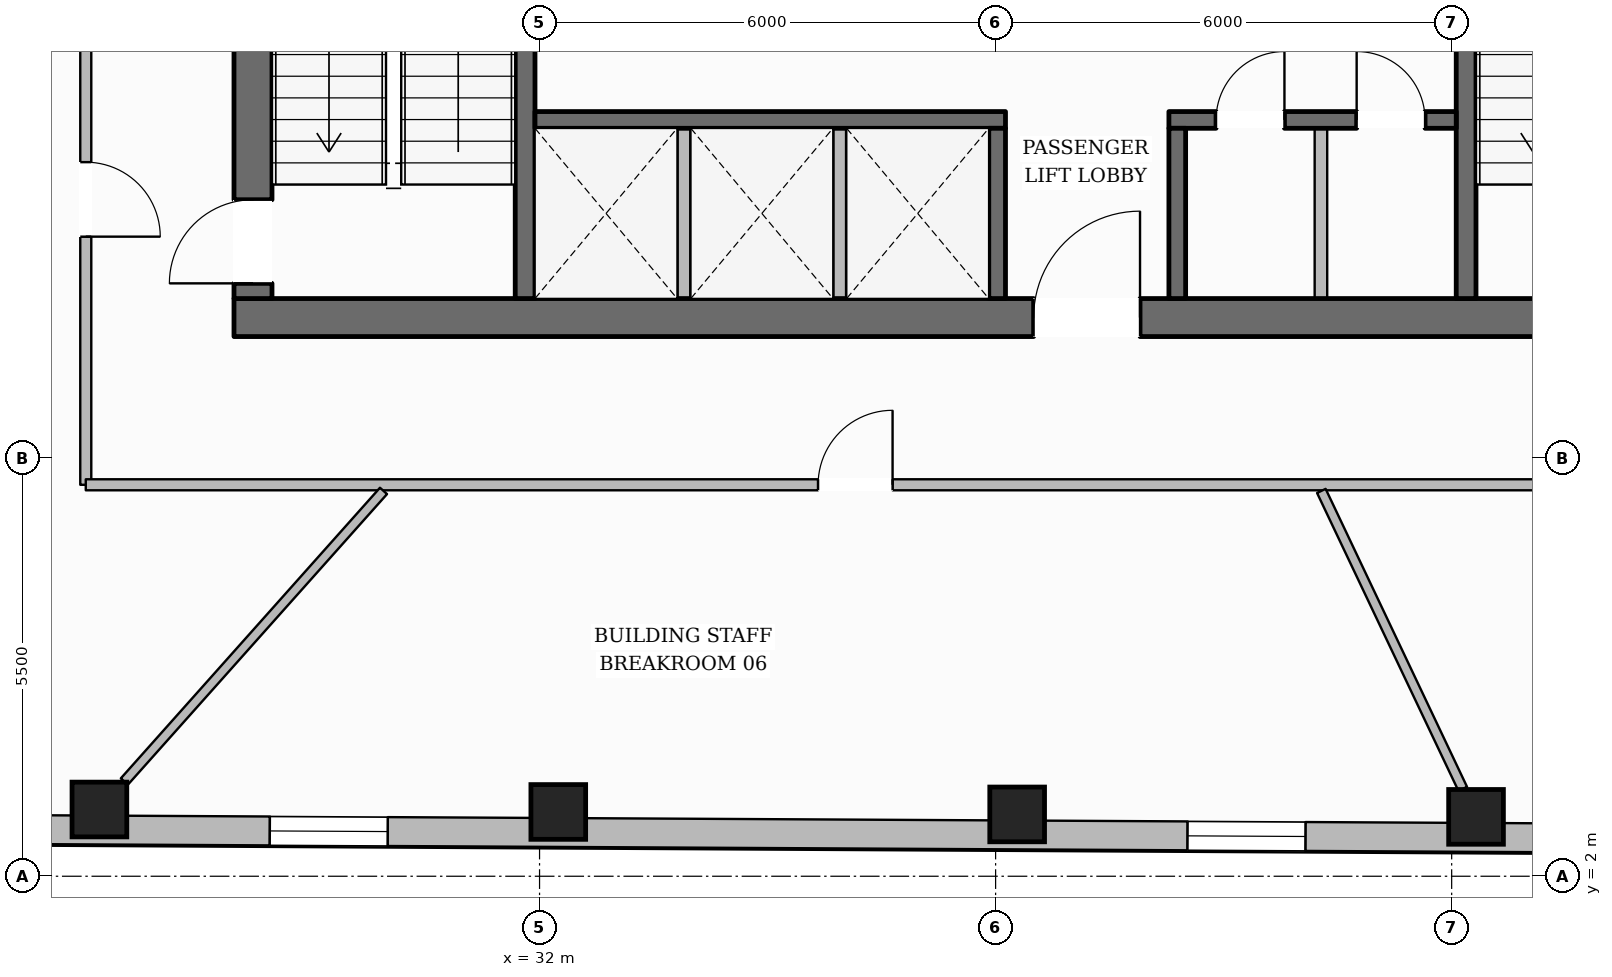
"""IFC4 building model, lengths in metres.
Left out: names, types, materials, properties, quantities, classifications, styles, units other than length and angle.
Written with IfcOpenShell. Run it as: python <this file> out.ifc"""

import sys

from ifc_helpers import new_model, si_unit, direction, frame, frame_2d, origin, origin_2d, place, context, subcontext, project, spatial, rectangle, hollow_rectangle, extrude, element, fill, save


model = new_model("IFC4")
c1 = context("Model", 3, precision=1e-05, world=origin(), true_north=direction((0.0, 1.0)))
c2 = subcontext(c1, "Body", "Model", "MODEL_VIEW")
j1 = project(units=[si_unit("LENGTHUNIT", "METRE"), si_unit("PLANEANGLEUNIT", "RADIAN")], contexts=[c1])
p1 = place(None, origin())
s1 = spatial("IfcSite", under=j1, at=p1, CompositionType="ELEMENT")
p2 = place(p1, origin())
s2 = spatial("IfcBuilding", under=s1, at=p2, CompositionType="ELEMENT")
p3 = place(p2, frame((0.0, 0.0, 124.0)))
s3 = spatial("IfcBuildingStorey", under=s2, at=p3, CompositionType="ELEMENT", Elevation=124.0)
p4 = place(p3, frame((27.98, 9.35, 0.0), z_axis=(0.0, 0.0, 1.0), x_axis=(1.0, 0.0, 0.0)))
e1 = element("IfcWall", 1, at=p4, inside=s3, PredefinedType="SOLIDWALL", context=c2, shape_type="SweptSolid", body=[
    extrude(rectangle(XDim=20.04, YDim=0.5, at=frame_2d((10.02, 0.0))), origin(), (0.0, 0.0, 1.0), 3.6),
])
p5 = place(p4, frame((10.52, 0.0, 0.0)))
e2 = element("IfcOpeningElement", 2, at=p5, cuts=e1, PredefinedType="OPENING", context=c2, shape_type="SweptSolid", body=[
    extrude(rectangle(XDim=1.4, YDim=2.2, at=frame_2d((0.7, 1.1))), frame((0.0, 0.26, 0.0), z_axis=(0.0, -1.0, 0.0), x_axis=(1.0, 0.0, 0.0)), (0.0, 0.0, 1.0), 0.52),
])
p6 = place(p3, frame((28.23, 9.6, 0.0), z_axis=(0.0, 0.0, 1.0), x_axis=(0.0, 1.0, 0.0)))
e3 = element("IfcWall", 3, at=p6, inside=s3, PredefinedType="SOLIDWALL", context=c2, shape_type="SweptSolid", body=[
    extrude(rectangle(XDim=13.0, YDim=0.5, at=frame_2d((6.5, 0.0))), origin(), (0.0, 0.0, 1.0), 3.6),
])
p7 = place(p6, frame((0.2, 0.0, 0.0)))
e4 = element("IfcOpeningElement", 4, at=p7, cuts=e3, PredefinedType="OPENING", context=c2, shape_type="SweptSolid", body=[
    extrude(rectangle(XDim=1.1, YDim=2.15, at=frame_2d((0.55, 1.075))), frame((0.0, 0.26, 0.0), z_axis=(0.0, -1.0, 0.0), x_axis=(1.0, 0.0, 0.0)), (0.0, 0.0, 1.0), 0.52),
])
p8 = place(p6, frame((8.4, 0.0, 0.0)))
e5 = element("IfcOpeningElement", 5, at=p8, cuts=e3, PredefinedType="OPENING", context=c2, shape_type="SweptSolid", body=[
    extrude(rectangle(XDim=0.9, YDim=2.1, at=frame_2d((0.45, 1.05))), frame((0.0, 0.26, 0.0), z_axis=(0.0, -1.0, 0.0), x_axis=(1.0, 0.0, 0.0)), (0.0, 0.0, 1.0), 0.52),
])
p9 = place(p3, frame((31.81, 9.6, 0.0), z_axis=(0.0, 0.0, 1.0), x_axis=(0.0, 1.0, 0.0)))
e6 = element("IfcWall", 6, at=p9, inside=s3, PredefinedType="SHEAR", context=c2, shape_type="SweptSolid", body=[
    extrude(rectangle(XDim=13.0, YDim=0.26, at=frame_2d((6.5, 0.0))), origin(), (0.0, 0.0, 1.0), 3.6),
])
p10 = place(p9, frame((10.925, 0.0, 0.0)))
e7 = element("IfcOpeningElement", 7, at=p10, cuts=e6, PredefinedType="OPENING", context=c2, shape_type="SweptSolid", body=[
    extrude(rectangle(XDim=1.25, YDim=2.25, at=frame_2d((0.625, 1.125))), frame((0.0, 0.14, 0.0), z_axis=(0.0, -1.0, 0.0), x_axis=(1.0, 0.0, 0.0)), (0.0, 0.0, 1.0), 0.28),
])
p11 = place(p3, frame((44.19, 9.6, 0.0), z_axis=(0.0, 0.0, 1.0), x_axis=(0.0, 1.0, 0.0)))
e8 = element("IfcWall", 8, at=p11, inside=s3, PredefinedType="SHEAR", context=c2, shape_type="SweptSolid", body=[
    extrude(rectangle(XDim=13.0, YDim=0.26, at=frame_2d((6.5, 0.0))), origin(), (0.0, 0.0, 1.0), 3.6),
])
p12 = place(p11, frame((10.925, 0.0, 0.0)))
e9 = element("IfcOpeningElement", 9, at=p12, cuts=e8, PredefinedType="OPENING", context=c2, shape_type="SweptSolid", body=[
    extrude(rectangle(XDim=1.25, YDim=2.25, at=frame_2d((0.625, 1.125))), frame((0.0, 0.14, 0.0), z_axis=(0.0, -1.0, 0.0), x_axis=(1.0, 0.0, 0.0)), (0.0, 0.0, 1.0), 0.28),
])
p13 = place(p3, frame((31.94, 11.95, 0.0), z_axis=(0.0, 0.0, 1.0), x_axis=(1.0, 0.0, 0.0)))
e10 = element("IfcWall", 10, at=p13, inside=s3, PredefinedType="SOLIDWALL", context=c2, shape_type="SweptSolid", body=[
    extrude(rectangle(XDim=6.19, YDim=0.22, at=frame_2d((3.095, 0.0))), origin(), (0.0, 0.0, 1.0), 3.6),
])
p14 = place(p3, frame((40.28, 11.95, 0.0), z_axis=(0.0, 0.0, 1.0), x_axis=(1.0, 0.0, 0.0)))
e11 = element("IfcWall", 11, at=p14, inside=s3, PredefinedType="SOLIDWALL", context=c2, shape_type="SweptSolid", body=[
    extrude(rectangle(XDim=3.78, YDim=0.22, at=frame_2d((1.89, 0.0))), origin(), (0.0, 0.0, 1.0), 3.6),
])
p15 = place(p14, frame((0.62, 0.0, 0.0)))
e12 = element("IfcOpeningElement", 12, at=p15, cuts=e11, PredefinedType="OPENING", context=c2, shape_type="SweptSolid", body=[
    extrude(rectangle(XDim=0.9, YDim=2.1, at=frame_2d((0.45, 1.05))), frame((0.0, 0.12, 0.0), z_axis=(0.0, -1.0, 0.0), x_axis=(1.0, 0.0, 0.0)), (0.0, 0.0, 1.0), 0.24),
])
p16 = place(p14, frame((2.47, 0.0, 0.0)))
e13 = element("IfcOpeningElement", 13, at=p16, cuts=e11, PredefinedType="OPENING", context=c2, shape_type="SweptSolid", body=[
    extrude(rectangle(XDim=0.9, YDim=2.1, at=frame_2d((0.45, 1.05))), frame((0.0, 0.12, 0.0), z_axis=(0.0, -1.0, 0.0), x_axis=(1.0, 0.0, 0.0)), (0.0, 0.0, 1.0), 0.24),
])
for number, where, z_axis, x_axis in (
    (14, (38.02, 9.6, 0.0), (0.0, 0.0, 1.0), (0.0, 1.0, 0.0)),
    (15, (40.39, 9.6, 0.0), (0.0, 0.0, 1.0), (0.0, 1.0, 0.0)),
):
    element("IfcWall", number, at=place(p3, frame(where, z_axis=z_axis, x_axis=x_axis)), inside=s3, PredefinedType="SOLIDWALL", context=c2, shape_type="SweptSolid", body=[
        extrude(rectangle(XDim=2.24, YDim=0.22, at=frame_2d((1.12, 0.0))), origin(), (0.0, 0.0, 1.0), 3.6),
    ])
for number, where, z_axis, x_axis in (
    (16, (26.209, 2.878, 0.0), (0.0, 0.0, 1.0), (1.0, 0.0, 0.0)),
    (17, (32.247, 2.846, 0.0), (0.0, 0.0, 1.0), (1.0, 0.0, 0.0)),
    (18, (38.283, 2.813, 0.0), (0.0, 0.0, 1.0), (1.0, 0.0, 0.0)),
    (19, (44.321, 2.781, 0.0), (0.0, 0.0, 1.0), (1.0, 0.0, 0.0)),
):
    element("IfcColumn", number, at=place(p3, frame(where, z_axis=z_axis, x_axis=x_axis)), inside=s3, PredefinedType="COLUMN", context=c2, shape_type="SweptSolid", body=[
        extrude(hollow_rectangle(XDim=0.72, YDim=0.72, WallThickness=0.032, at=origin_2d()), origin(), (0.0, 0.0, 1.0), 3.6),
    ])
p17 = place(p3, frame((13.815, 12.649, 0.0), z_axis=(0.0, 0.0, 1.0), x_axis=(0.501718288841, 0.865031073801, 0.0)))
e20 = element("IfcWall", 20, at=p17, inside=s3, PredefinedType="STANDARD", context=c2, shape_type="SweptSolid", body=[
    extrude(rectangle(XDim=36.708, YDim=0.38, at=frame_2d((18.354, 0.0))), origin(), (0.0, 0.0, 1.0), 3.059),
])
p18 = place(p17, frame((32.476, 0.0, 0.65)))
e21 = element("IfcOpeningElement", 21, at=p18, cuts=e20, PredefinedType="OPENING", context=c2, shape_type="SweptSolid", body=[
    extrude(rectangle(XDim=1.55, YDim=1.75, at=frame_2d((0.775, 0.875))), frame((0.0, 0.2, 0.0), z_axis=(0.0, -1.0, 0.0), x_axis=(1.0, 0.0, 0.0)), (0.0, 0.0, 1.0), 0.4),
])
p19 = place(p17, frame((26.517, 0.0, 0.65)))
e22 = element("IfcOpeningElement", 22, at=p19, cuts=e20, PredefinedType="OPENING", context=c2, shape_type="SweptSolid", body=[
    extrude(rectangle(XDim=1.55, YDim=1.75, at=frame_2d((0.775, 0.875))), frame((0.0, 0.2, 0.0), z_axis=(0.0, -1.0, 0.0), x_axis=(1.0, 0.0, 0.0)), (0.0, 0.0, 1.0), 0.4),
])
p20 = place(p17, frame((14.601, 0.0, 0.65)))
e23 = element("IfcOpeningElement", 23, at=p20, cuts=e20, PredefinedType="OPENING", context=c2, shape_type="SweptSolid", body=[
    extrude(rectangle(XDim=1.55, YDim=1.75, at=frame_2d((0.775, 0.875))), frame((0.0, 0.2, 0.0), z_axis=(0.0, -1.0, 0.0), x_axis=(1.0, 0.0, 0.0)), (0.0, 0.0, 1.0), 0.4),
])
p21 = place(p17, frame((8.643, 0.0, 0.65)))
e24 = element("IfcOpeningElement", 24, at=p21, cuts=e20, PredefinedType="OPENING", context=c2, shape_type="SweptSolid", body=[
    extrude(rectangle(XDim=1.55, YDim=1.75, at=frame_2d((0.775, 0.875))), frame((0.0, 0.2, 0.0), z_axis=(0.0, -1.0, 0.0), x_axis=(1.0, 0.0, 0.0)), (0.0, 0.0, 1.0), 0.4),
])
p22 = place(p17, frame((2.684, 0.0, 0.65)))
e25 = element("IfcOpeningElement", 25, at=p22, cuts=e20, PredefinedType="OPENING", context=c2, shape_type="SweptSolid", body=[
    extrude(rectangle(XDim=1.55, YDim=1.75, at=frame_2d((0.775, 0.875))), frame((0.0, 0.2, 0.0), z_axis=(0.0, -1.0, 0.0), x_axis=(1.0, 0.0, 0.0)), (0.0, 0.0, 1.0), 0.4),
])
p23 = place(p3, frame((56.871, 2.444, 0.0), z_axis=(0.0, 0.0, 1.0), x_axis=(-0.999985675059, 0.00535253921, 0.0)))
e26 = element("IfcWall", 26, at=p23, inside=s3, PredefinedType="STANDARD", context=c2, shape_type="SweptSolid", body=[
    extrude(rectangle(XDim=37.174, YDim=0.38, at=frame_2d((18.587, 0.0))), origin(), (0.0, 0.0, 1.0), 3.059),
])
p24 = place(p23, frame((32.907, 0.0, 0.65)))
e27 = element("IfcOpeningElement", 27, at=p24, cuts=e26, PredefinedType="OPENING", context=c2, shape_type="SweptSolid", body=[
    extrude(rectangle(XDim=1.55, YDim=1.75, at=frame_2d((0.775, 0.875))), frame((0.0, 0.2, 0.0), z_axis=(0.0, -1.0, 0.0), x_axis=(1.0, 0.0, 0.0)), (0.0, 0.0, 1.0), 0.4),
])
p25 = place(p23, frame((26.87, 0.0, 0.65)))
e28 = element("IfcOpeningElement", 28, at=p25, cuts=e26, PredefinedType="OPENING", context=c2, shape_type="SweptSolid", body=[
    extrude(rectangle(XDim=1.55, YDim=1.75, at=frame_2d((0.775, 0.875))), frame((0.0, 0.2, 0.0), z_axis=(0.0, -1.0, 0.0), x_axis=(1.0, 0.0, 0.0)), (0.0, 0.0, 1.0), 0.4),
])
p26 = place(p23, frame((14.796, 0.0, 0.65)))
e29 = element("IfcOpeningElement", 29, at=p26, cuts=e26, PredefinedType="OPENING", context=c2, shape_type="SweptSolid", body=[
    extrude(rectangle(XDim=1.55, YDim=1.75, at=frame_2d((0.775, 0.875))), frame((0.0, 0.2, 0.0), z_axis=(0.0, -1.0, 0.0), x_axis=(1.0, 0.0, 0.0)), (0.0, 0.0, 1.0), 0.4),
])
p27 = place(p23, frame((8.759, 0.0, 0.65)))
e30 = element("IfcOpeningElement", 30, at=p27, cuts=e26, PredefinedType="OPENING", context=c2, shape_type="SweptSolid", body=[
    extrude(rectangle(XDim=1.55, YDim=1.75, at=frame_2d((0.775, 0.875))), frame((0.0, 0.2, 0.0), z_axis=(0.0, -1.0, 0.0), x_axis=(1.0, 0.0, 0.0)), (0.0, 0.0, 1.0), 0.4),
])
p28 = place(p23, frame((2.722, 0.0, 0.65)))
e31 = element("IfcOpeningElement", 31, at=p28, cuts=e26, PredefinedType="OPENING", context=c2, shape_type="SweptSolid", body=[
    extrude(rectangle(XDim=1.55, YDim=1.75, at=frame_2d((0.775, 0.875))), frame((0.0, 0.2, 0.0), z_axis=(0.0, -1.0, 0.0), x_axis=(1.0, 0.0, 0.0)), (0.0, 0.0, 1.0), 0.4),
])
p29 = place(p3, frame((43.881, 44.336, 0.0), z_axis=(0.0, 0.0, 1.0), x_axis=(0.506335448268, -0.862336601234, 0.0)))
e32 = element("IfcWall", 32, at=p29, inside=s3, PredefinedType="STANDARD", context=c2, shape_type="SweptSolid", body=[
    extrude(rectangle(XDim=37.05, YDim=0.38, at=frame_2d((18.525, 0.0))), origin(), (0.0, 0.0, 1.0), 3.059),
])
p30 = place(p29, frame((32.786, 0.0, 0.65)))
e33 = element("IfcOpeningElement", 33, at=p30, cuts=e32, PredefinedType="OPENING", context=c2, shape_type="SweptSolid", body=[
    extrude(rectangle(XDim=1.55, YDim=1.75, at=frame_2d((0.775, 0.875))), frame((0.0, 0.2, 0.0), z_axis=(0.0, -1.0, 0.0), x_axis=(1.0, 0.0, 0.0)), (0.0, 0.0, 1.0), 0.4),
])
p31 = place(p29, frame((26.77, 0.0, 0.65)))
e34 = element("IfcOpeningElement", 34, at=p31, cuts=e32, PredefinedType="OPENING", context=c2, shape_type="SweptSolid", body=[
    extrude(rectangle(XDim=1.55, YDim=1.75, at=frame_2d((0.775, 0.875))), frame((0.0, 0.2, 0.0), z_axis=(0.0, -1.0, 0.0), x_axis=(1.0, 0.0, 0.0)), (0.0, 0.0, 1.0), 0.4),
])
p32 = place(p29, frame((14.738, 0.0, 0.65)))
e35 = element("IfcOpeningElement", 35, at=p32, cuts=e32, PredefinedType="OPENING", context=c2, shape_type="SweptSolid", body=[
    extrude(rectangle(XDim=1.55, YDim=1.75, at=frame_2d((0.775, 0.875))), frame((0.0, 0.2, 0.0), z_axis=(0.0, -1.0, 0.0), x_axis=(1.0, 0.0, 0.0)), (0.0, 0.0, 1.0), 0.4),
])
p33 = place(p29, frame((8.722, 0.0, 0.65)))
e36 = element("IfcOpeningElement", 36, at=p33, cuts=e32, PredefinedType="OPENING", context=c2, shape_type="SweptSolid", body=[
    extrude(rectangle(XDim=1.55, YDim=1.75, at=frame_2d((0.775, 0.875))), frame((0.0, 0.2, 0.0), z_axis=(0.0, -1.0, 0.0), x_axis=(1.0, 0.0, 0.0)), (0.0, 0.0, 1.0), 0.4),
])
p34 = place(p29, frame((2.706, 0.0, 0.65)))
e37 = element("IfcOpeningElement", 37, at=p34, cuts=e32, PredefinedType="OPENING", context=c2, shape_type="SweptSolid", body=[
    extrude(rectangle(XDim=1.55, YDim=1.75, at=frame_2d((0.775, 0.875))), frame((0.0, 0.2, 0.0), z_axis=(0.0, -1.0, 0.0), x_axis=(1.0, 0.0, 0.0)), (0.0, 0.0, 1.0), 0.4),
])
for number, where, z_axis, x_axis in (
    (38, (33.9, 9.55, 0.0), (0.0, 0.0, 1.0), (0.0, 1.0, 0.0)),
    (39, (35.95, 9.55, 0.0), (0.0, 0.0, 1.0), (0.0, 1.0, 0.0)),
    (40, (42.28, 9.55, 0.0), (0.0, 0.0, 1.0), (0.0, 1.0, 0.0)),
):
    element("IfcWall", number, at=place(p3, frame(where, z_axis=z_axis, x_axis=x_axis)), inside=s3, PredefinedType="PARTITIONING", context=c2, shape_type="SweptSolid", body=[
        extrude(rectangle(XDim=2.29, YDim=0.165, at=frame_2d((1.145, 0.0))), origin(), (0.0, 0.0, 1.0), 3.6),
    ])
p35 = place(p3, frame((26.03, 25.05, 0.0), z_axis=(0.0, 0.0, 1.0), x_axis=(0.0, -1.0, 0.0)))
e41 = element("IfcWall", 41, at=p35, inside=s3, PredefinedType="PARTITIONING", context=c2, shape_type="SweptSolid", body=[
    extrude(rectangle(XDim=17.9, YDim=0.145, at=frame_2d((8.95, 0.0))), origin(), (0.0, 0.0, 1.0), 3.288),
])
p36 = place(p35, frame((4.876, 0.0, 0.0)))
e42 = element("IfcOpeningElement", 42, at=p36, cuts=e41, PredefinedType="OPENING", context=c2, shape_type="SweptSolid", body=[
    extrude(rectangle(XDim=0.98, YDim=2.15, at=frame_2d((0.49, 1.075))), frame((0.0, 0.083, 0.0), z_axis=(0.0, -1.0, 0.0), x_axis=(1.0, 0.0, 0.0)), (0.0, 0.0, 1.0), 0.165),
])
p37 = place(p35, frame((13.656, 0.0, 0.0)))
e43 = element("IfcOpeningElement", 43, at=p37, cuts=e41, PredefinedType="OPENING", context=c2, shape_type="SweptSolid", body=[
    extrude(rectangle(XDim=0.98, YDim=2.15, at=frame_2d((0.49, 1.075))), frame((0.0, 0.083, 0.0), z_axis=(0.0, -1.0, 0.0), x_axis=(1.0, 0.0, 0.0)), (0.0, 0.0, 1.0), 0.165),
])
p38 = place(p3, frame((26.03, 7.15, 0.0), z_axis=(0.0, 0.0, 1.0), x_axis=(1.0, 0.0, 0.0)))
e44 = element("IfcWall", 44, at=p38, inside=s3, PredefinedType="PARTITIONING", context=c2, shape_type="SweptSolid", body=[
    extrude(rectangle(XDim=23.94, YDim=0.145, at=frame_2d((11.97, 0.0))), origin(), (0.0, 0.0, 1.0), 3.6),
])
p39 = place(p38, frame((9.635, 0.0, 0.0)))
e45 = element("IfcOpeningElement", 45, at=p39, cuts=e44, PredefinedType="OPENING", context=c2, shape_type="SweptSolid", body=[
    extrude(rectangle(XDim=0.98, YDim=2.15, at=frame_2d((0.49, 1.075))), frame((0.0, 0.083, 0.0), z_axis=(0.0, -1.0, 0.0), x_axis=(1.0, 0.0, 0.0)), (0.0, 0.0, 1.0), 0.165),
])
p40 = place(p3, frame((29.947, 7.07, 0.0), z_axis=(0.0, 0.0, 1.0), x_axis=(-0.665563912799, -0.746340859111, 0.0)))
e46 = element("IfcWall", 46, at=p40, inside=s3, PredefinedType="PARTITIONING", context=c2, shape_type="SweptSolid", body=[
    extrude(rectangle(XDim=5.123, YDim=0.125, at=frame_2d((2.562, 0.0))), origin(), (0.0, 0.0, 1.0), 3.6),
])
p41 = place(p3, frame((42.285, 7.07, 0.0), z_axis=(0.0, 0.0, 1.0), x_axis=(0.42875612636, -0.903420269924, 0.0)))
e47 = element("IfcWall", 47, at=p41, inside=s3, PredefinedType="PARTITIONING", context=c2, shape_type="SweptSolid", body=[
    extrude(rectangle(XDim=4.34, YDim=0.125, at=frame_2d((2.17, 0.0))), origin(), (0.0, 0.0, 1.0), 3.6),
])
p42 = place(p25, origin())
e48 = element("IfcWindow", 48, at=p42, inside=s3, PartitioningType="SINGLE_PANEL", PredefinedType="WINDOW", context=c2, shape_type="SweptSolid", body=[
    extrude(rectangle(XDim=1.55, YDim=1.75, at=frame_2d((0.775, 0.875))), frame((0.0, 0.03, 0.0), z_axis=(0.0, -1.0, 0.0), x_axis=(1.0, 0.0, 0.0)), (0.0, 0.0, 1.0), 0.06),
])
fill(e28, e48)
p43 = place(p26, origin())
e49 = element("IfcWindow", 49, at=p43, inside=s3, PartitioningType="SINGLE_PANEL", PredefinedType="WINDOW", context=c2, shape_type="SweptSolid", body=[
    extrude(rectangle(XDim=1.55, YDim=1.75, at=frame_2d((0.775, 0.875))), frame((0.0, 0.03, 0.0), z_axis=(0.0, -1.0, 0.0), x_axis=(1.0, 0.0, 0.0)), (0.0, 0.0, 1.0), 0.06),
])
fill(e29, e49)
p44 = place(p7, origin())
e50 = element("IfcDoor", 50, at=p44, inside=s3, OperationType="SINGLE_SWING_LEFT", PredefinedType="DOOR", context=c2, shape_type="SweptSolid", body=[
    extrude(rectangle(XDim=1.1, YDim=2.15, at=frame_2d((0.55, 1.075))), frame((0.0, 0.025, 0.0), z_axis=(0.0, -1.0, 0.0), x_axis=(1.0, 0.0, 0.0)), (0.0, 0.0, 1.0), 0.05),
])
fill(e4, e50)
p45 = place(p5, origin())
e51 = element("IfcDoor", 51, at=p45, inside=s3, OperationType="SINGLE_SWING_RIGHT", PredefinedType="DOOR", context=c2, shape_type="SweptSolid", body=[
    extrude(rectangle(XDim=1.4, YDim=2.2, at=frame_2d((0.7, 1.1))), frame((0.0, 0.025, 0.0), z_axis=(0.0, -1.0, 0.0), x_axis=(1.0, 0.0, 0.0)), (0.0, 0.0, 1.0), 0.05),
])
fill(e2, e51)
p46 = place(p15, origin())
e52 = element("IfcDoor", 52, at=p46, inside=s3, OperationType="SINGLE_SWING_RIGHT", PredefinedType="DOOR", context=c2, shape_type="SweptSolid", body=[
    extrude(rectangle(XDim=0.9, YDim=2.1, at=frame_2d((0.45, 1.05))), frame((0.0, 0.025, 0.0), z_axis=(0.0, -1.0, 0.0), x_axis=(1.0, 0.0, 0.0)), (0.0, 0.0, 1.0), 0.05),
])
fill(e12, e52)
p47 = place(p16, origin())
e53 = element("IfcDoor", 53, at=p47, inside=s3, OperationType="SINGLE_SWING_LEFT", PredefinedType="DOOR", context=c2, shape_type="SweptSolid", body=[
    extrude(rectangle(XDim=0.9, YDim=2.1, at=frame_2d((0.45, 1.05))), frame((0.0, 0.025, 0.0), z_axis=(0.0, -1.0, 0.0), x_axis=(1.0, 0.0, 0.0)), (0.0, 0.0, 1.0), 0.05),
])
fill(e13, e53)
p48 = place(p37, origin())
e54 = element("IfcDoor", 54, at=p48, inside=s3, OperationType="SINGLE_SWING_RIGHT", PredefinedType="DOOR", context=c2, shape_type="SweptSolid", body=[
    extrude(rectangle(XDim=0.98, YDim=2.15, at=frame_2d((0.49, 1.075))), frame((0.0, 0.025, 0.0), z_axis=(0.0, -1.0, 0.0), x_axis=(1.0, 0.0, 0.0)), (0.0, 0.0, 1.0), 0.05),
])
fill(e43, e54)
p49 = place(p39, origin())
e55 = element("IfcDoor", 55, at=p49, inside=s3, OperationType="SINGLE_SWING_RIGHT", PredefinedType="DOOR", context=c2, shape_type="SweptSolid", body=[
    extrude(rectangle(XDim=0.98, YDim=2.15, at=frame_2d((0.49, 1.075))), frame((0.0, 0.025, 0.0), z_axis=(0.0, -1.0, 0.0), x_axis=(1.0, 0.0, 0.0)), (0.0, 0.0, 1.0), 0.05),
])
fill(e45, e55)
save(model, sys.argv[1])
